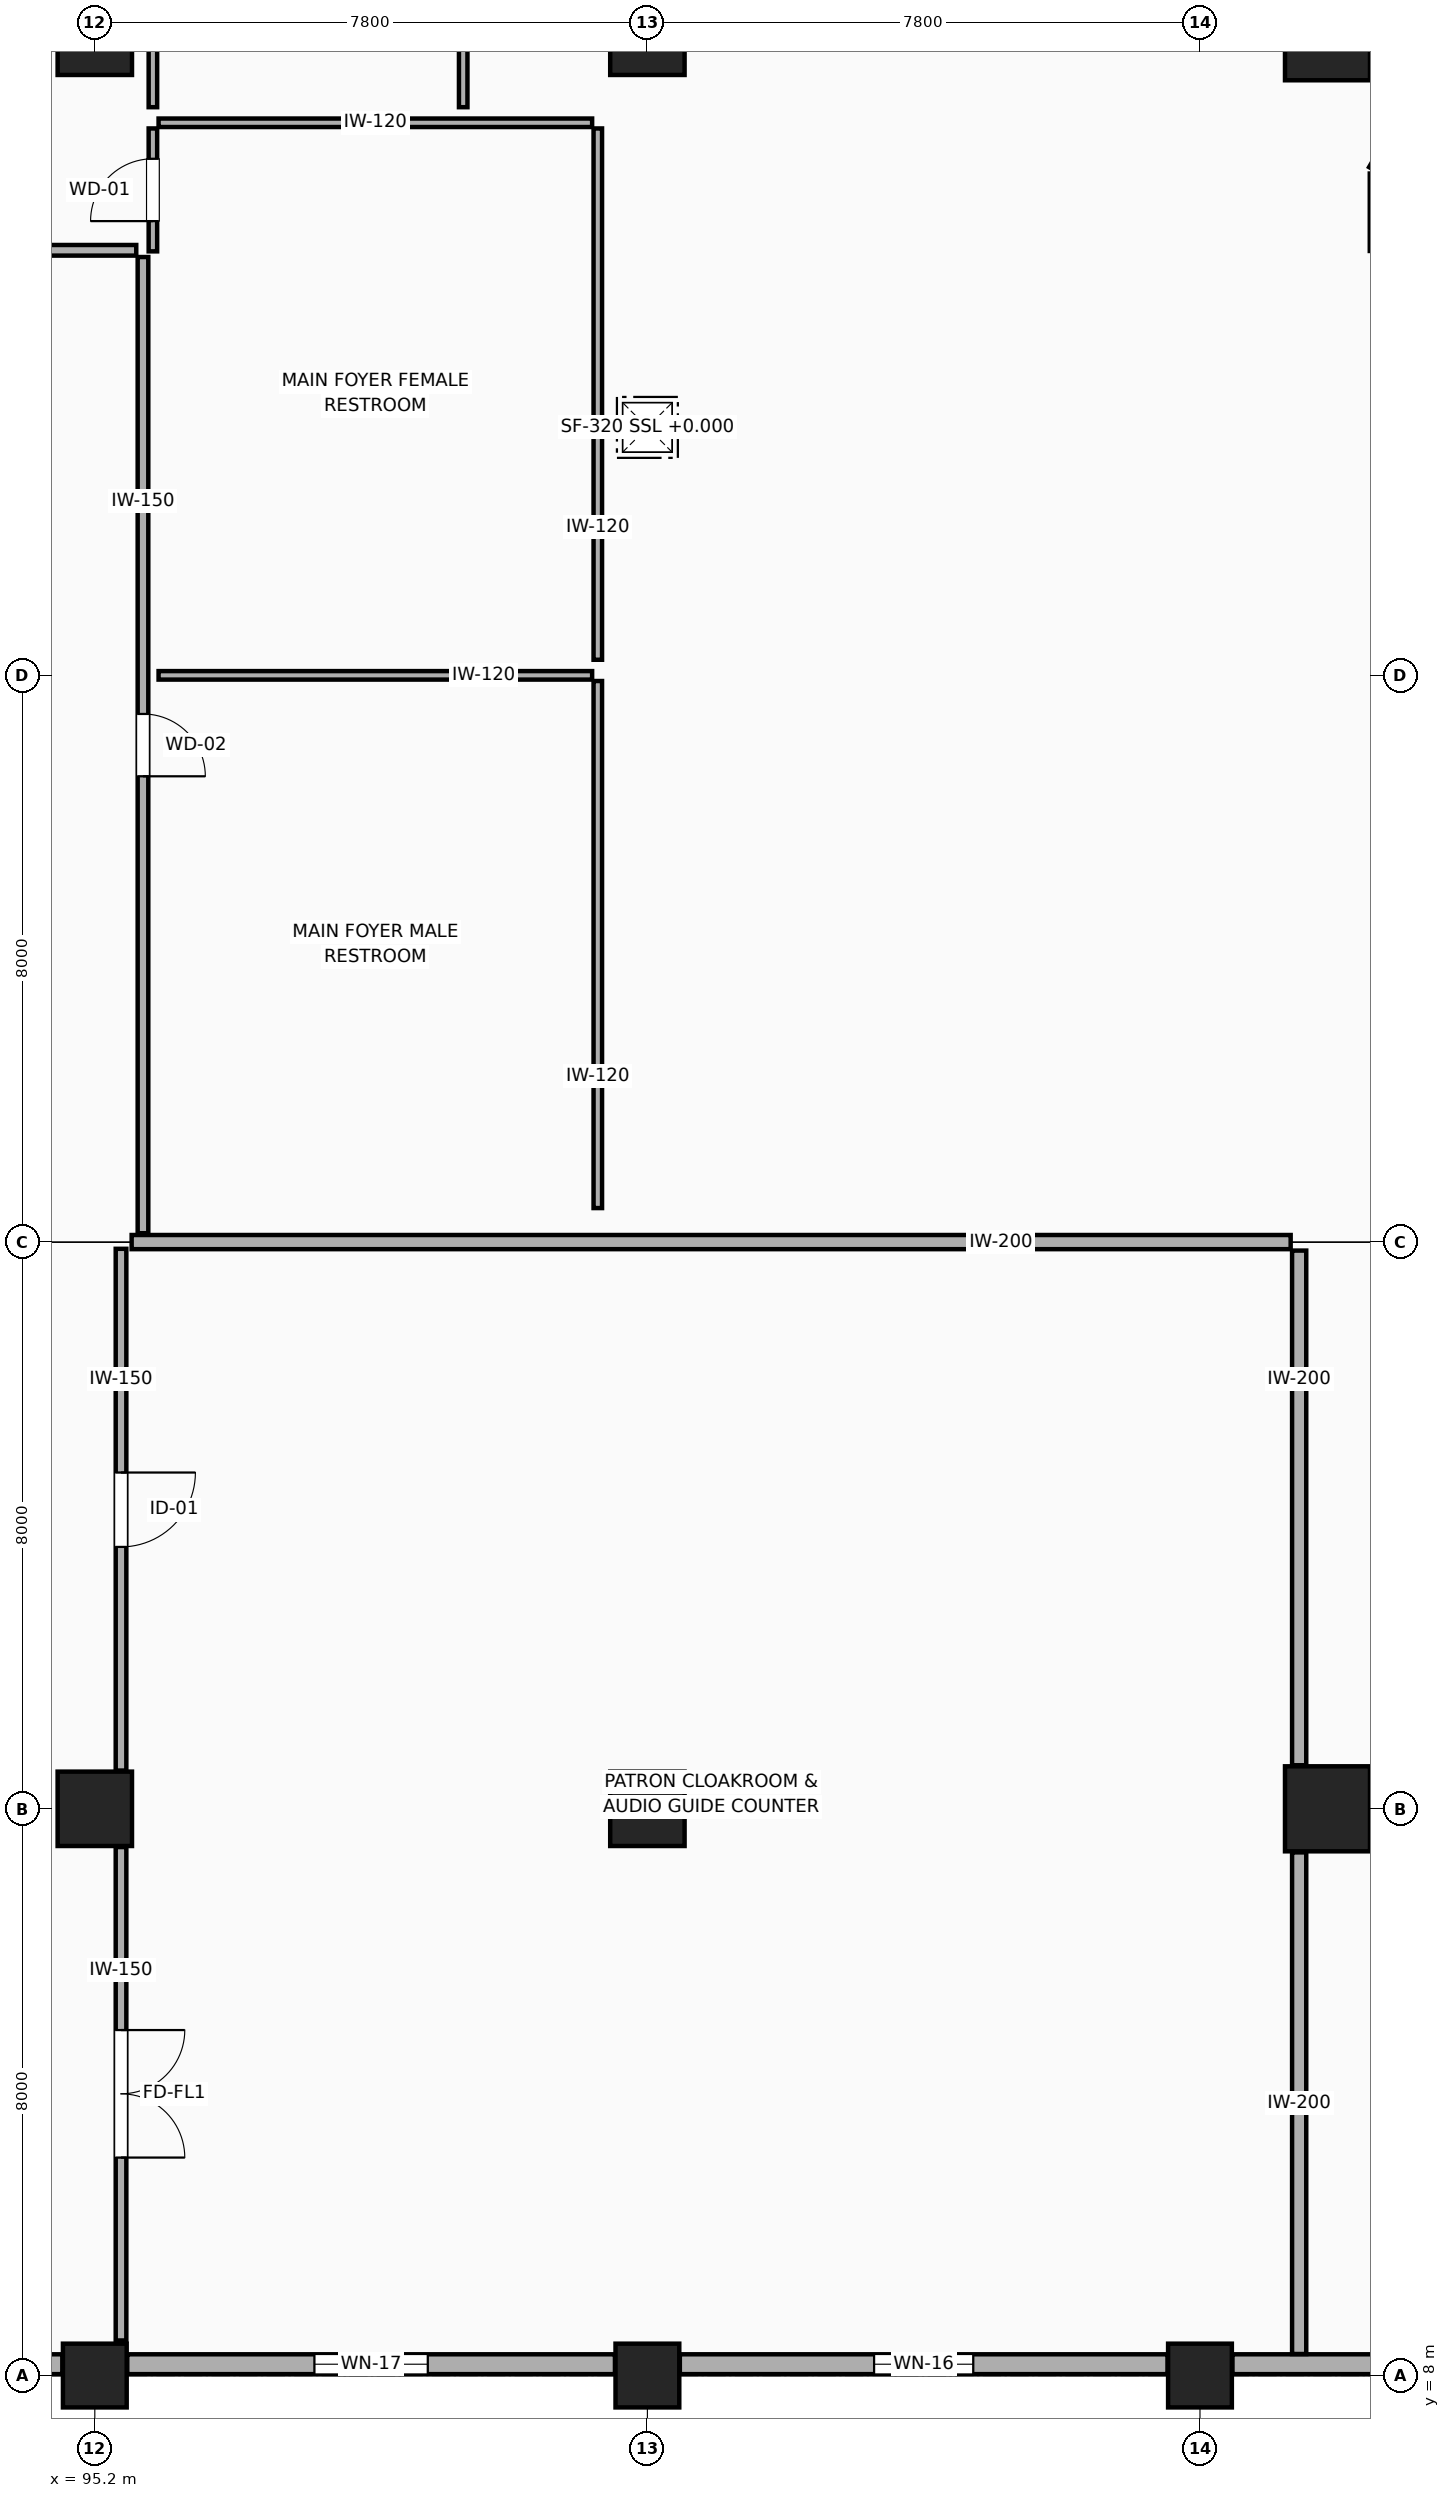
"""IFC4 building model, lengths in metres.
Left out: names, types, materials, properties, quantities, classifications, styles, units other than length and angle.
Written with IfcOpenShell. Run it as: python <this file> out.ifc"""

import sys

from ifc_helpers import new_model, si_unit, direction, frame, frame_2d, origin, origin_2d, place, context, subcontext, project, spatial, rectangle, extrude, element, fill, save


model = new_model("IFC4")
c1 = context("Model", 3, precision=1e-05, world=origin(), true_north=direction((0.0, 1.0)))
c2 = subcontext(c1, "Body", "Model", "MODEL_VIEW")
j1 = project(units=[si_unit("LENGTHUNIT", "METRE"), si_unit("PLANEANGLEUNIT", "RADIAN")], contexts=[c1])
p1 = place(None, origin())
s1 = spatial("IfcSite", under=j1, at=p1, CompositionType="ELEMENT")
p2 = place(p1, origin())
s2 = spatial("IfcBuilding", under=s1, at=p2, CompositionType="ELEMENT")
p3 = place(p2, origin())
s3 = spatial("IfcBuildingStorey", under=s2, at=p3, CompositionType="ELEMENT", Elevation=0.0)
for number, where, z_axis, x_axis in (
    (1, (95.2, 8.0, 0.0), (0.0, 0.0, 1.0), (1.0, 0.0, 0.0)),
    (2, (103.0, 8.0, 0.0), (0.0, 0.0, 1.0), (1.0, 0.0, 0.0)),
    (3, (110.8, 8.0, 0.0), (0.0, 0.0, 1.0), (1.0, 0.0, 0.0)),
):
    element("IfcColumn", number, at=place(p3, frame(where, z_axis=z_axis, x_axis=x_axis)), inside=s3, PredefinedType="COLUMN", context=c2, shape_type="SweptSolid", body=[
        extrude(rectangle(XDim=0.9, YDim=0.9, at=origin_2d()), origin(), (0.0, 0.0, 1.0), 5.4),
    ])
for number, where, z_axis, x_axis in (
    (4, (95.2, 16.0, 0.0), (0.0, 0.0, 1.0), (1.0, 0.0, 0.0)),
    (5, (95.2, 41.0, 0.0), (0.0, 0.0, 1.0), (1.0, 0.0, 0.0)),
    (6, (103.0, 16.0, 0.0), (0.0, 0.0, 1.0), (1.0, 0.0, 0.0)),
    (7, (103.0, 41.0, 0.0), (0.0, 0.0, 1.0), (1.0, 0.0, 0.0)),
):
    element("IfcColumn", number, at=place(p3, frame(where, z_axis=z_axis, x_axis=x_axis)), inside=s3, PredefinedType="COLUMN", context=c2, shape_type="SweptSolid", body=[
        extrude(rectangle(XDim=1.05, YDim=1.05, at=origin_2d()), origin(), (0.0, 0.0, 1.0), 5.4),
    ])
for number, where, z_axis, x_axis in (
    (8, (112.6, 16.0, 0.0), (0.0, 0.0, 1.0), (1.0, 0.0, 0.0)),
    (9, (112.6, 41.0, 0.0), (0.0, 0.0, 1.0), (1.0, 0.0, 0.0)),
):
    element("IfcColumn", number, at=place(p3, frame(where, z_axis=z_axis, x_axis=x_axis)), inside=s3, PredefinedType="COLUMN", context=c2, shape_type="SweptSolid", body=[
        extrude(rectangle(XDim=1.2, YDim=1.2, at=origin_2d()), origin(), (0.0, 0.0, 1.0), 5.4),
    ])
p4 = place(p3, frame((118.45, 8.16, 0.0), z_axis=(0.0, 0.0, 1.0), x_axis=(-1.0, 0.0, 0.0)))
e10 = element("IfcWall", 10, at=p4, inside=s3, PredefinedType="STANDARD", context=c2, shape_type="SweptSolid", body=[
    extrude(rectangle(XDim=7.192, YDim=0.28, at=frame_2d((3.596, 0.0))), origin(), (0.0, 0.0, 1.0), 5.4),
])
p5 = place(p4, frame((2.896, 0.0, 0.95)))
e11 = element("IfcOpeningElement", 11, at=p5, cuts=e10, PredefinedType="OPENING", context=c2, shape_type="SweptSolid", body=[
    extrude(rectangle(XDim=1.4, YDim=1.8, at=frame_2d((0.7, 0.9))), frame((0.0, 0.15, 0.0), z_axis=(0.0, -1.0, 0.0), x_axis=(1.0, 0.0, 0.0)), (0.0, 0.0, 1.0), 0.3),
])
p6 = place(p3, frame((110.342, 8.16, 0.0), z_axis=(0.0, 0.0, 1.0), x_axis=(-1.0, 0.0, 0.0)))
e12 = element("IfcWall", 12, at=p6, inside=s3, PredefinedType="STANDARD", context=c2, shape_type="SweptSolid", body=[
    extrude(rectangle(XDim=6.884, YDim=0.28, at=frame_2d((3.442, 0.0))), origin(), (0.0, 0.0, 1.0), 4.705),
])
p7 = place(p6, frame((2.742, 0.0, 0.95)))
e13 = element("IfcOpeningElement", 13, at=p7, cuts=e12, PredefinedType="OPENING", context=c2, shape_type="SweptSolid", body=[
    extrude(rectangle(XDim=1.4, YDim=2.1, at=frame_2d((0.7, 1.05))), frame((0.0, 0.15, 0.0), z_axis=(0.0, -1.0, 0.0), x_axis=(1.0, 0.0, 0.0)), (0.0, 0.0, 1.0), 0.3),
])
p8 = place(p3, frame((102.542, 8.16, 0.0), z_axis=(0.0, 0.0, 1.0), x_axis=(-1.0, 0.0, 0.0)))
e14 = element("IfcWall", 14, at=p8, inside=s3, PredefinedType="STANDARD", context=c2, shape_type="SweptSolid", body=[
    extrude(rectangle(XDim=6.884, YDim=0.28, at=frame_2d((3.442, 0.0))), origin(), (0.0, 0.0, 1.0), 4.655),
])
p9 = place(p8, frame((2.642, 0.0, 0.95)))
e15 = element("IfcOpeningElement", 15, at=p9, cuts=e14, PredefinedType="OPENING", context=c2, shape_type="SweptSolid", body=[
    extrude(rectangle(XDim=1.6, YDim=1.2, at=frame_2d((0.8, 0.6))), frame((0.0, 0.15, 0.0), z_axis=(0.0, -1.0, 0.0), x_axis=(1.0, 0.0, 0.0)), (0.0, 0.0, 1.0), 0.3),
])
p10 = place(p3, frame((94.742, 8.16, 0.0), z_axis=(0.0, 0.0, 1.0), x_axis=(-1.0, 0.0, 0.0)))
e16 = element("IfcWall", 16, at=p10, inside=s3, PredefinedType="STANDARD", context=c2, shape_type="SweptSolid", body=[
    extrude(rectangle(XDim=6.884, YDim=0.28, at=frame_2d((3.442, 0.0))), origin(), (0.0, 0.0, 1.0), 4.605),
])
p11 = place(p10, frame((2.642, 0.0, 0.95)))
e17 = element("IfcOpeningElement", 17, at=p11, cuts=e16, PredefinedType="OPENING", context=c2, shape_type="SweptSolid", body=[
    extrude(rectangle(XDim=1.6, YDim=1.5, at=frame_2d((0.8, 0.75))), frame((0.0, 0.15, 0.0), z_axis=(0.0, -1.0, 0.0), x_axis=(1.0, 0.0, 0.0)), (0.0, 0.0, 1.0), 0.3),
])
for number, where, z_axis, x_axis in (
    (18, (113.885, 40.033, 0.0), (0.0, 0.0, 1.0), (-0.5, -0.866, 0.0)),
    (19, (113.372, 39.083, 0.0), (0.0, 0.0, 1.0), (0.0, -1.0, 0.0)),
):
    element("IfcWall", number, at=place(p3, frame(where, z_axis=z_axis, x_axis=x_axis)), inside=s3, PredefinedType="SHEAR", context=c2, shape_type="SweptSolid", body=[
        extrude(rectangle(XDim=1.093, YDim=0.35, at=frame_2d((0.546, 0.0))), origin(), (0.0, 0.0, 1.0), 5.12),
    ])
p12 = place(p3, frame((63.145, 38.0, 0.0), z_axis=(0.0, 0.0, 1.0), x_axis=(1.0, 0.0, 0.0)))
e20 = element("IfcWall", 20, at=p12, inside=s3, PredefinedType="PARTITIONING", context=c2, shape_type="SweptSolid", body=[
    extrude(rectangle(XDim=32.64, YDim=0.15, at=frame_2d((16.32, 0.0))), origin(), (0.0, 0.0, 1.0), 4.3),
])
p13 = place(p12, frame((15.845, 0.0, 0.0)))
e21 = element("IfcOpeningElement", 21, at=p13, cuts=e20, PredefinedType="OPENING", context=c2, shape_type="SweptSolid", body=[
    extrude(rectangle(XDim=0.95, YDim=2.15, at=frame_2d((0.475, 1.075))), frame((0.0, 0.085, 0.0), z_axis=(0.0, -1.0, 0.0), x_axis=(1.0, 0.0, 0.0)), (0.0, 0.0, 1.0), 0.17),
])
p14 = place(p3, frame((95.88, 37.905, 0.0), z_axis=(0.0, 0.0, 1.0), x_axis=(0.0, -1.0, 0.0)))
e22 = element("IfcWall", 22, at=p14, inside=s3, PredefinedType="PARTITIONING", context=c2, shape_type="SweptSolid", body=[
    extrude(rectangle(XDim=13.78, YDim=0.15, at=frame_2d((6.89, 0.0))), origin(), (0.0, 0.0, 1.0), 5.4),
])
p15 = place(p14, frame((6.45, 0.0, 0.0)))
e23 = element("IfcOpeningElement", 23, at=p15, cuts=e22, PredefinedType="OPENING", context=c2, shape_type="SweptSolid", body=[
    extrude(rectangle(XDim=0.88, YDim=2.1, at=frame_2d((0.44, 1.05))), frame((0.0, 0.085, 0.0), z_axis=(0.0, -1.0, 0.0), x_axis=(1.0, 0.0, 0.0)), (0.0, 0.0, 1.0), 0.17),
])
p16 = place(p3, frame((95.57, 23.905, 0.0), z_axis=(0.0, 0.0, 1.0), x_axis=(0.0, -1.0, 0.0)))
e24 = element("IfcWall", 24, at=p16, inside=s3, PredefinedType="PARTITIONING", context=c2, shape_type="SweptSolid", body=[
    extrude(rectangle(XDim=7.365, YDim=0.15, at=frame_2d((3.683, 0.0))), origin(), (0.0, 0.0, 1.0), 4.3),
])
p17 = place(p16, frame((3.158, 0.0, 0.0)))
e25 = element("IfcOpeningElement", 25, at=p17, cuts=e24, PredefinedType="OPENING", context=c2, shape_type="SweptSolid", body=[
    extrude(rectangle(XDim=1.05, YDim=2.15, at=frame_2d((0.525, 1.075))), frame((0.0, 0.085, 0.0), z_axis=(0.0, -1.0, 0.0), x_axis=(1.0, 0.0, 0.0)), (0.0, 0.0, 1.0), 0.17),
])
p18 = place(p3, frame((95.57, 15.46, 0.0), z_axis=(0.0, 0.0, 1.0), x_axis=(0.0, -1.0, 0.0)))
e26 = element("IfcWall", 26, at=p18, inside=s3, PredefinedType="PARTITIONING", context=c2, shape_type="SweptSolid", body=[
    extrude(rectangle(XDim=6.965, YDim=0.15, at=frame_2d((3.482, 0.0))), origin(), (0.0, 0.0, 1.0), 4.3),
])
p19 = place(p18, frame((2.583, 0.0, 0.0)))
e27 = element("IfcOpeningElement", 27, at=p19, cuts=e26, PredefinedType="OPENING", context=c2, shape_type="SweptSolid", body=[
    extrude(rectangle(XDim=1.8, YDim=2.15, at=frame_2d((0.9, 1.075))), frame((0.0, 0.085, 0.0), z_axis=(0.0, -1.0, 0.0), x_axis=(1.0, 0.0, 0.0)), (0.0, 0.0, 1.0), 0.17),
])
p20 = place(p3, frame((95.72, 24.0, 0.0), z_axis=(0.0, 0.0, 1.0), x_axis=(1.0, 0.0, 0.0)))
e28 = element("IfcWall", 28, at=p20, inside=s3, PredefinedType="PARTITIONING", context=c2, shape_type="SweptSolid", body=[
    extrude(rectangle(XDim=16.36, YDim=0.2, at=frame_2d((8.18, 0.0))), origin(), (0.0, 0.0, 1.0), 4.3),
])
p21 = place(p3, frame((112.2, 23.88, 0.0), z_axis=(0.0, 0.0, 1.0), x_axis=(0.0, -1.0, 0.0)))
e29 = element("IfcWall", 29, at=p21, inside=s3, PredefinedType="PARTITIONING", context=c2, shape_type="SweptSolid", body=[
    extrude(rectangle(XDim=7.265, YDim=0.2, at=frame_2d((3.632, 0.0))), origin(), (0.0, 0.0, 1.0), 4.3),
])
p22 = place(p3, frame((112.2, 15.385, 0.0), z_axis=(0.0, 0.0, 1.0), x_axis=(0.0, -1.0, 0.0)))
e30 = element("IfcWall", 30, at=p22, inside=s3, PredefinedType="PARTITIONING", context=c2, shape_type="SweptSolid", body=[
    extrude(rectangle(XDim=7.081, YDim=0.2, at=frame_2d((3.541, 0.0))), origin(), (0.0, 0.0, 1.0), 4.3),
])
p23 = place(p3, frame((102.3, 31.92, 0.0), z_axis=(0.0, 0.0, 1.0), x_axis=(0.0, -1.0, 0.0)))
e31 = element("IfcWall", 31, at=p23, inside=s3, PredefinedType="PARTITIONING", context=c2, shape_type="SweptSolid", body=[
    extrude(rectangle(XDim=7.44, YDim=0.12, at=frame_2d((3.72, 0.0))), origin(), (0.0, 0.0, 1.0), 5.4),
])
p24 = place(p3, frame((96.1, 32.0, 0.0), z_axis=(0.0, 0.0, 1.0), x_axis=(1.0, 0.0, 0.0)))
e32 = element("IfcWall", 32, at=p24, inside=s3, PredefinedType="PARTITIONING", context=c2, shape_type="SweptSolid", body=[
    extrude(rectangle(XDim=6.12, YDim=0.12, at=frame_2d((3.06, 0.0))), origin(), (0.0, 0.0, 1.0), 5.4),
])
p25 = place(p3, frame((102.3, 39.72, 0.0), z_axis=(0.0, 0.0, 1.0), x_axis=(0.0, -1.0, 0.0)))
e33 = element("IfcWall", 33, at=p25, inside=s3, PredefinedType="PARTITIONING", context=c2, shape_type="SweptSolid", body=[
    extrude(rectangle(XDim=7.5, YDim=0.12, at=frame_2d((3.75, 0.0))), origin(), (0.0, 0.0, 1.0), 5.11),
])
p26 = place(p3, frame((96.02, 37.985, 0.0), z_axis=(0.0, 0.0, 1.0), x_axis=(0.0, 1.0, 0.0)))
e34 = element("IfcWall", 34, at=p26, inside=s3, PredefinedType="PARTITIONING", context=c2, shape_type="SweptSolid", body=[
    extrude(rectangle(XDim=1.735, YDim=0.12, at=frame_2d((0.867, 0.0))), origin(), (0.0, 0.0, 1.0), 5.11),
])
p27 = place(p26, frame((0.427, 0.0, 0.0)))
e35 = element("IfcOpeningElement", 35, at=p27, cuts=e34, PredefinedType="OPENING", context=c2, shape_type="SweptSolid", body=[
    extrude(rectangle(XDim=0.88, YDim=2.1, at=frame_2d((0.44, 1.05))), frame((0.0, 0.07, 0.0), z_axis=(0.0, -1.0, 0.0), x_axis=(1.0, 0.0, 0.0)), (0.0, 0.0, 1.0), 0.14),
])
p28 = place(p3, frame((96.1, 39.8, 0.0), z_axis=(0.0, 0.0, 1.0), x_axis=(1.0, 0.0, 0.0)))
e36 = element("IfcWall", 36, at=p28, inside=s3, PredefinedType="PARTITIONING", context=c2, shape_type="SweptSolid", body=[
    extrude(rectangle(XDim=6.12, YDim=0.12, at=frame_2d((3.06, 0.0))), origin(), (0.0, 0.0, 1.0), 5.11),
])
p29 = place(p3, frame((100.4, 44.72, 0.0), z_axis=(0.0, 0.0, 1.0), x_axis=(0.0, -1.0, 0.0)))
e37 = element("IfcWall", 37, at=p29, inside=s3, PredefinedType="PARTITIONING", context=c2, shape_type="SweptSolid", body=[
    extrude(rectangle(XDim=4.7, YDim=0.12, at=frame_2d((2.35, 0.0))), origin(), (0.0, 0.0, 1.0), 4.75),
])
p30 = place(p3, frame((96.02, 40.02, 0.0), z_axis=(0.0, 0.0, 1.0), x_axis=(0.0, 1.0, 0.0)))
e38 = element("IfcWall", 38, at=p30, inside=s3, PredefinedType="PARTITIONING", context=c2, shape_type="SweptSolid", body=[
    extrude(rectangle(XDim=4.7, YDim=0.12, at=frame_2d((2.35, 0.0))), origin(), (0.0, 0.0, 1.0), 5.11),
])
p31 = place(p30, frame((1.91, 0.0, 0.0)))
e39 = element("IfcOpeningElement", 39, at=p31, cuts=e38, PredefinedType="OPENING", context=c2, shape_type="SweptSolid", body=[
    extrude(rectangle(XDim=0.88, YDim=2.1, at=frame_2d((0.44, 1.05))), frame((0.0, 0.07, 0.0), z_axis=(0.0, -1.0, 0.0), x_axis=(1.0, 0.0, 0.0)), (0.0, 0.0, 1.0), 0.14),
])
p32 = place(p7, origin())
e40 = element("IfcWindow", 40, at=p32, inside=s3, PartitioningType="SINGLE_PANEL", PredefinedType="WINDOW", context=c2, shape_type="SweptSolid", body=[
    extrude(rectangle(XDim=1.4, YDim=2.1, at=frame_2d((0.7, 1.05))), frame((0.0, 0.03, 0.0), z_axis=(0.0, -1.0, 0.0), x_axis=(1.0, 0.0, 0.0)), (0.0, 0.0, 1.0), 0.06),
])
fill(e13, e40)
p33 = place(p9, origin())
e41 = element("IfcWindow", 41, at=p33, inside=s3, PartitioningType="SINGLE_PANEL", PredefinedType="WINDOW", context=c2, shape_type="SweptSolid", body=[
    extrude(rectangle(XDim=1.6, YDim=1.2, at=frame_2d((0.8, 0.6))), frame((0.0, 0.03, 0.0), z_axis=(0.0, -1.0, 0.0), x_axis=(1.0, 0.0, 0.0)), (0.0, 0.0, 1.0), 0.06),
])
fill(e15, e41)
p34 = place(p17, origin())
e42 = element("IfcDoor", 42, at=p34, inside=s3, OperationType="SINGLE_SWING_LEFT", PredefinedType="DOOR", context=c2, shape_type="SweptSolid", body=[
    extrude(rectangle(XDim=1.05, YDim=2.15, at=frame_2d((0.525, 1.075))), frame((0.0, 0.025, 0.0), z_axis=(0.0, -1.0, 0.0), x_axis=(1.0, 0.0, 0.0)), (0.0, 0.0, 1.0), 0.05),
])
fill(e25, e42)
p35 = place(p15, origin())
e43 = element("IfcDoor", 43, at=p35, inside=s3, OperationType="SINGLE_SWING_RIGHT", PredefinedType="DOOR", context=c2, shape_type="SweptSolid", body=[
    extrude(rectangle(XDim=0.88, YDim=2.1, at=frame_2d((0.44, 1.05))), frame((0.0, 0.025, 0.0), z_axis=(0.0, -1.0, 0.0), x_axis=(1.0, 0.0, 0.0)), (0.0, 0.0, 1.0), 0.05),
])
fill(e23, e43)
p36 = place(p27, origin())
e44 = element("IfcDoor", 44, at=p36, inside=s3, OperationType="SINGLE_SWING_LEFT", PredefinedType="DOOR", context=c2, shape_type="SweptSolid", body=[
    extrude(rectangle(XDim=0.88, YDim=2.1, at=frame_2d((0.44, 1.05))), frame((0.0, 0.025, 0.0), z_axis=(0.0, -1.0, 0.0), x_axis=(1.0, 0.0, 0.0)), (0.0, 0.0, 1.0), 0.05),
])
fill(e35, e44)
p37 = place(p19, origin())
e45 = element("IfcDoor", 45, at=p37, inside=s3, OperationType="DOUBLE_DOOR_SINGLE_SWING", PredefinedType="DOOR", context=c2, shape_type="SweptSolid", body=[
    extrude(rectangle(XDim=1.8, YDim=2.15, at=frame_2d((0.9, 1.075))), frame((0.0, 0.025, 0.0), z_axis=(0.0, -1.0, 0.0), x_axis=(1.0, 0.0, 0.0)), (0.0, 0.0, 1.0), 0.05),
])
fill(e27, e45)
save(model, sys.argv[1])
